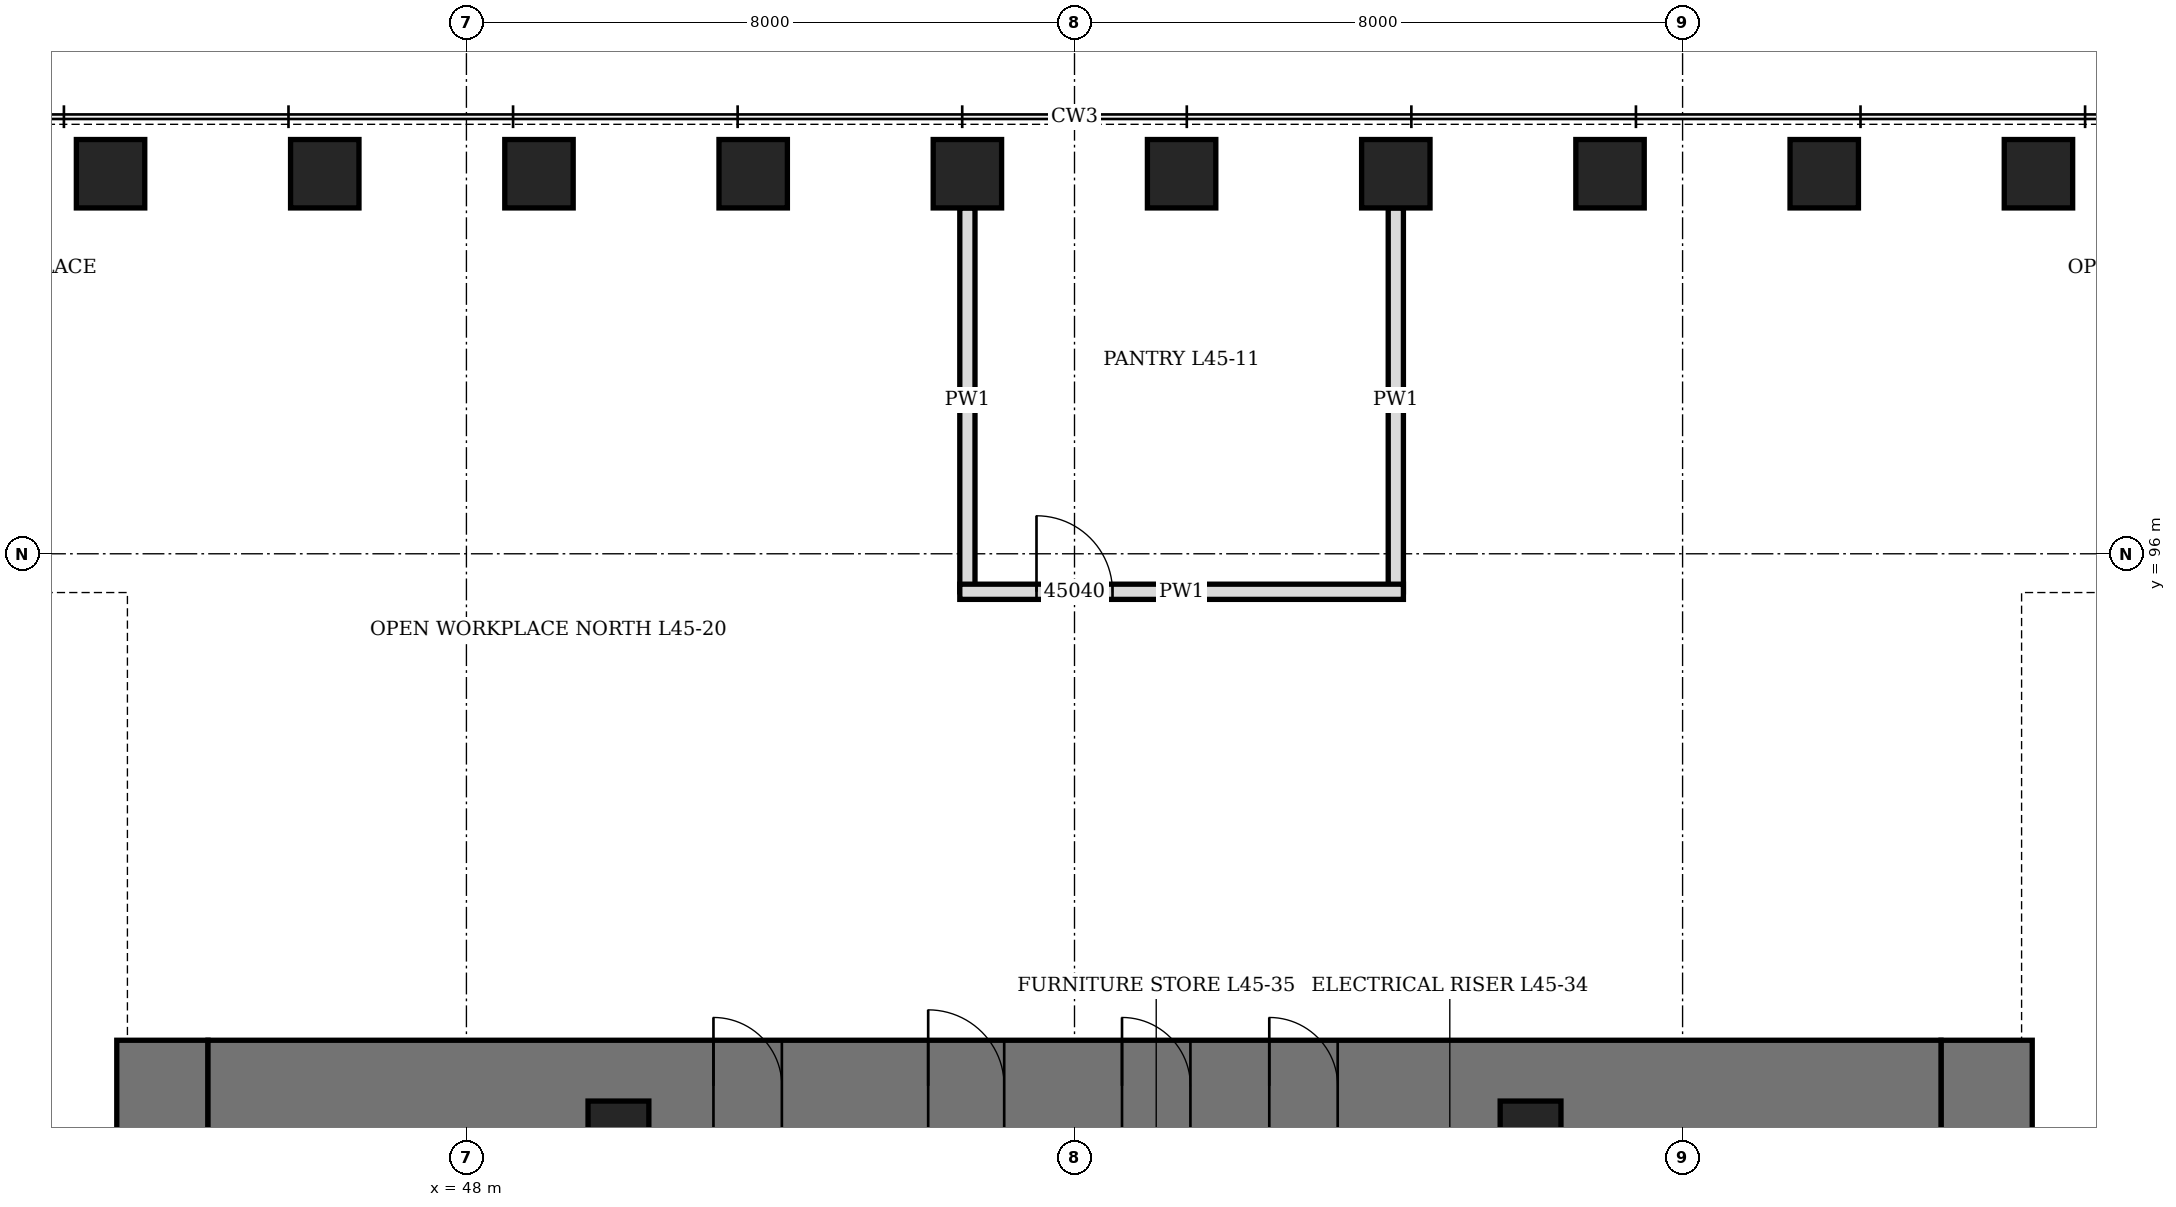
"""IFC4 building model, lengths in metres.
Left out: names, types, materials, properties, quantities, classifications, styles, units other than length and angle.
Written with IfcOpenShell. Run it as: python <this file> out.ifc"""

import sys

from ifc_helpers import new_model, si_unit, direction, frame, frame_2d, origin, origin_2d, place, context, subcontext, project, spatial, rectangle, hollow_rectangle, extrude, element, fill, save


model = new_model("IFC4")
c1 = context("Model", 3, precision=1e-05, world=origin(), true_north=direction((0.0, 1.0)))
c2 = subcontext(c1, "Body", "Model", "MODEL_VIEW")
j1 = project(units=[si_unit("LENGTHUNIT", "METRE"), si_unit("PLANEANGLEUNIT", "RADIAN")], contexts=[c1])
p1 = place(None, origin())
s1 = spatial("IfcSite", under=j1, at=p1, CompositionType="ELEMENT")
p2 = place(p1, origin())
s2 = spatial("IfcBuilding", under=s1, at=p2, CompositionType="ELEMENT")
p3 = place(p2, frame((0.0, 0.0, 202.3)))
s3 = spatial("IfcBuildingStorey", under=s2, at=p3, CompositionType="ELEMENT", Elevation=202.3)
for number, where, z_axis, x_axis in (
    (1, (68.682, 101.0, 0.0), (0.0, 0.0, 1.0), (1.0, 0.0, 0.0)),
    (2, (65.864, 101.0, 0.0), (0.0, 0.0, 1.0), (1.0, 0.0, 0.0)),
    (3, (63.045, 101.0, 0.0), (0.0, 0.0, 1.0), (1.0, 0.0, 0.0)),
    (4, (60.227, 101.0, 0.0), (0.0, 0.0, 1.0), (1.0, 0.0, 0.0)),
    (5, (57.409, 101.0, 0.0), (0.0, 0.0, 1.0), (1.0, 0.0, 0.0)),
    (6, (54.591, 101.0, 0.0), (0.0, 0.0, 1.0), (1.0, 0.0, 0.0)),
    (7, (51.773, 101.0, 0.0), (0.0, 0.0, 1.0), (1.0, 0.0, 0.0)),
    (8, (48.955, 101.0, 0.0), (0.0, 0.0, 1.0), (1.0, 0.0, 0.0)),
    (9, (46.136, 101.0, 0.0), (0.0, 0.0, 1.0), (1.0, 0.0, 0.0)),
    (10, (43.318, 101.0, 0.0), (0.0, 0.0, 1.0), (1.0, 0.0, 0.0)),
):
    element("IfcColumn", number, at=place(p3, frame(where, z_axis=z_axis, x_axis=x_axis)), inside=s3, PredefinedType="COLUMN", context=c2, shape_type="SweptSolid", body=[
        extrude(hollow_rectangle(XDim=0.9, YDim=0.9, WallThickness=0.12, at=origin_2d()), origin(), (0.0, 0.0, 1.0), 4.2),
    ])
p4 = place(p3, frame((44.0, 70.4, 0.0), z_axis=(0.0, 0.0, 1.0), x_axis=(0.0, 1.0, 0.0)))
e11 = element("IfcWall", 11, at=p4, inside=s3, PredefinedType="SHEAR", context=c2, shape_type="SweptSolid", body=[
    extrude(rectangle(XDim=19.2, YDim=1.2, at=frame_2d((9.6, 0.0))), origin(), (0.0, 0.0, 1.0), 4.2),
])
p5 = place(p4, frame((8.6, 0.0, 0.0)))
e12 = element("IfcOpeningElement", 12, at=p5, cuts=e11, PredefinedType="OPENING", context=c2, shape_type="SweptSolid", body=[
    extrude(rectangle(XDim=2.0, YDim=2.4, at=frame_2d((1.0, 1.2))), frame((0.0, 0.61, 0.0), z_axis=(0.0, -1.0, 0.0), x_axis=(1.0, 0.0, 0.0)), (0.0, 0.0, 1.0), 1.22),
])
p6 = place(p3, frame((68.0, 70.4, 0.0), z_axis=(0.0, 0.0, 1.0), x_axis=(0.0, 1.0, 0.0)))
e13 = element("IfcWall", 13, at=p6, inside=s3, PredefinedType="SHEAR", context=c2, shape_type="SweptSolid", body=[
    extrude(rectangle(XDim=19.2, YDim=1.2, at=frame_2d((9.6, 0.0))), origin(), (0.0, 0.0, 1.0), 4.2),
])
p7 = place(p6, frame((8.6, 0.0, 0.0)))
e14 = element("IfcOpeningElement", 14, at=p7, cuts=e13, PredefinedType="OPENING", context=c2, shape_type="SweptSolid", body=[
    extrude(rectangle(XDim=2.0, YDim=2.4, at=frame_2d((1.0, 1.2))), frame((0.0, 0.61, 0.0), z_axis=(0.0, -1.0, 0.0), x_axis=(1.0, 0.0, 0.0)), (0.0, 0.0, 1.0), 1.22),
])
p8 = place(p3, frame((44.6, 89.0, 0.0), z_axis=(0.0, 0.0, 1.0), x_axis=(1.0, 0.0, 0.0)))
e15 = element("IfcWall", 15, at=p8, inside=s3, PredefinedType="SHEAR", context=c2, shape_type="SweptSolid", body=[
    extrude(rectangle(XDim=22.8, YDim=1.2, at=frame_2d((11.4, 0.0))), origin(), (0.0, 0.0, 1.0), 4.2),
])
p9 = place(p8, frame((9.475, 0.0, 0.0)))
e16 = element("IfcOpeningElement", 16, at=p9, cuts=e15, PredefinedType="OPENING", context=c2, shape_type="SweptSolid", body=[
    extrude(rectangle(XDim=1.0, YDim=2.1, at=frame_2d((0.5, 1.05))), frame((0.0, 0.61, 0.0), z_axis=(0.0, -1.0, 0.0), x_axis=(1.0, 0.0, 0.0)), (0.0, 0.0, 1.0), 1.22),
])
p10 = place(p8, frame((6.65, 0.0, 0.0)))
e17 = element("IfcOpeningElement", 17, at=p10, cuts=e15, PredefinedType="OPENING", context=c2, shape_type="SweptSolid", body=[
    extrude(rectangle(XDim=0.9, YDim=2.1, at=frame_2d((0.45, 1.05))), frame((0.0, 0.61, 0.0), z_axis=(0.0, -1.0, 0.0), x_axis=(1.0, 0.0, 0.0)), (0.0, 0.0, 1.0), 1.22),
])
p11 = place(p8, frame((12.025, 0.0, 0.0)))
e18 = element("IfcOpeningElement", 18, at=p11, cuts=e15, PredefinedType="OPENING", context=c2, shape_type="SweptSolid", body=[
    extrude(rectangle(XDim=0.9, YDim=2.1, at=frame_2d((0.45, 1.05))), frame((0.0, 0.61, 0.0), z_axis=(0.0, -1.0, 0.0), x_axis=(1.0, 0.0, 0.0)), (0.0, 0.0, 1.0), 1.22),
])
p12 = place(p8, frame((13.962, 0.0, 0.0)))
e19 = element("IfcOpeningElement", 19, at=p12, cuts=e15, PredefinedType="OPENING", context=c2, shape_type="SweptSolid", body=[
    extrude(rectangle(XDim=0.9, YDim=2.1, at=frame_2d((0.45, 1.05))), frame((0.0, 0.61, 0.0), z_axis=(0.0, -1.0, 0.0), x_axis=(1.0, 0.0, 0.0)), (0.0, 0.0, 1.0), 1.22),
])
for number, where, z_axis, x_axis in (
    (20, (50.0, 88.4, 0.0), (0.0, 0.0, 1.0), (1.0, 0.0, 0.0)),
    (21, (62.0, 88.4, 0.0), (0.0, 0.0, 1.0), (1.0, 0.0, 0.0)),
):
    element("IfcColumn", number, at=place(p3, frame(where, z_axis=z_axis, x_axis=x_axis)), inside=s3, PredefinedType="COLUMN", context=c2, shape_type="SweptSolid", body=[
        extrude(hollow_rectangle(XDim=0.8, YDim=0.8, WallThickness=0.1, at=origin_2d()), origin(), (0.0, 0.0, 1.0), 4.2),
    ])
for number, where, z_axis, x_axis in (
    (22, (54.591, 95.5, 0.0), (0.0, 0.0, 1.0), (0.0, 1.0, 0.0)),
    (23, (60.227, 95.5, 0.0), (0.0, 0.0, 1.0), (0.0, 1.0, 0.0)),
):
    element("IfcWall", number, at=place(p3, frame(where, z_axis=z_axis, x_axis=x_axis)), inside=s3, PredefinedType="PARTITIONING", context=c2, shape_type="SweptSolid", body=[
        extrude(rectangle(XDim=5.05, YDim=0.2, at=frame_2d((2.525, 0.0))), origin(), (0.0, 0.0, 1.0), 3.428),
    ])
p13 = place(p3, frame((54.491, 95.5, 0.0), z_axis=(0.0, 0.0, 1.0), x_axis=(1.0, 0.0, 0.0)))
e24 = element("IfcWall", 24, at=p13, inside=s3, PredefinedType="PARTITIONING", context=c2, shape_type="SweptSolid", body=[
    extrude(rectangle(XDim=5.836, YDim=0.2, at=frame_2d((2.918, 0.0))), origin(), (0.0, 0.0, 1.0), 4.04),
])
p14 = place(p13, frame((1.009, 0.0, 0.0)))
e25 = element("IfcOpeningElement", 25, at=p14, cuts=e24, PredefinedType="OPENING", context=c2, shape_type="SweptSolid", body=[
    extrude(rectangle(XDim=1.0, YDim=2.1, at=frame_2d((0.5, 1.05))), frame((0.0, 0.11, 0.0), z_axis=(0.0, -1.0, 0.0), x_axis=(1.0, 0.0, 0.0)), (0.0, 0.0, 1.0), 0.22),
])
p15 = place(p9, origin())
e26 = element("IfcDoor", 26, at=p15, inside=s3, OperationType="SINGLE_SWING_LEFT", PredefinedType="DOOR", context=c2, shape_type="SweptSolid", body=[
    extrude(rectangle(XDim=1.0, YDim=2.1, at=frame_2d((0.5, 1.05))), frame((0.0, 0.35, 0.0), z_axis=(0.0, -1.0, 0.0), x_axis=(1.0, 0.0, 0.0)), (0.0, 0.0, 1.0), 0.7),
])
fill(e16, e26)
p16 = place(p10, origin())
e27 = element("IfcDoor", 27, at=p16, inside=s3, OperationType="SINGLE_SWING_LEFT", PredefinedType="DOOR", context=c2, shape_type="SweptSolid", body=[
    extrude(rectangle(XDim=0.9, YDim=2.1, at=frame_2d((0.45, 1.05))), frame((0.0, 0.35, 0.0), z_axis=(0.0, -1.0, 0.0), x_axis=(1.0, 0.0, 0.0)), (0.0, 0.0, 1.0), 0.7),
])
fill(e17, e27)
p17 = place(p11, origin())
e28 = element("IfcDoor", 28, at=p17, inside=s3, OperationType="SINGLE_SWING_LEFT", PredefinedType="DOOR", context=c2, shape_type="SweptSolid", body=[
    extrude(rectangle(XDim=0.9, YDim=2.1, at=frame_2d((0.45, 1.05))), frame((0.0, 0.35, 0.0), z_axis=(0.0, -1.0, 0.0), x_axis=(1.0, 0.0, 0.0)), (0.0, 0.0, 1.0), 0.7),
])
fill(e18, e28)
p18 = place(p12, origin())
e29 = element("IfcDoor", 29, at=p18, inside=s3, OperationType="SINGLE_SWING_LEFT", PredefinedType="DOOR", context=c2, shape_type="SweptSolid", body=[
    extrude(rectangle(XDim=0.9, YDim=2.1, at=frame_2d((0.45, 1.05))), frame((0.0, 0.35, 0.0), z_axis=(0.0, -1.0, 0.0), x_axis=(1.0, 0.0, 0.0)), (0.0, 0.0, 1.0), 0.7),
])
fill(e19, e29)
p19 = place(p14, origin())
e30 = element("IfcDoor", 30, at=p19, inside=s3, OperationType="SINGLE_SWING_LEFT", PredefinedType="DOOR", context=c2, shape_type="SweptSolid", body=[
    extrude(rectangle(XDim=1.0, YDim=2.1, at=frame_2d((0.5, 1.05))), frame((0.0, 0.1, 0.0), z_axis=(0.0, -1.0, 0.0), x_axis=(1.0, 0.0, 0.0)), (0.0, 0.0, 1.0), 0.199),
])
fill(e25, e30)
save(model, sys.argv[1])
